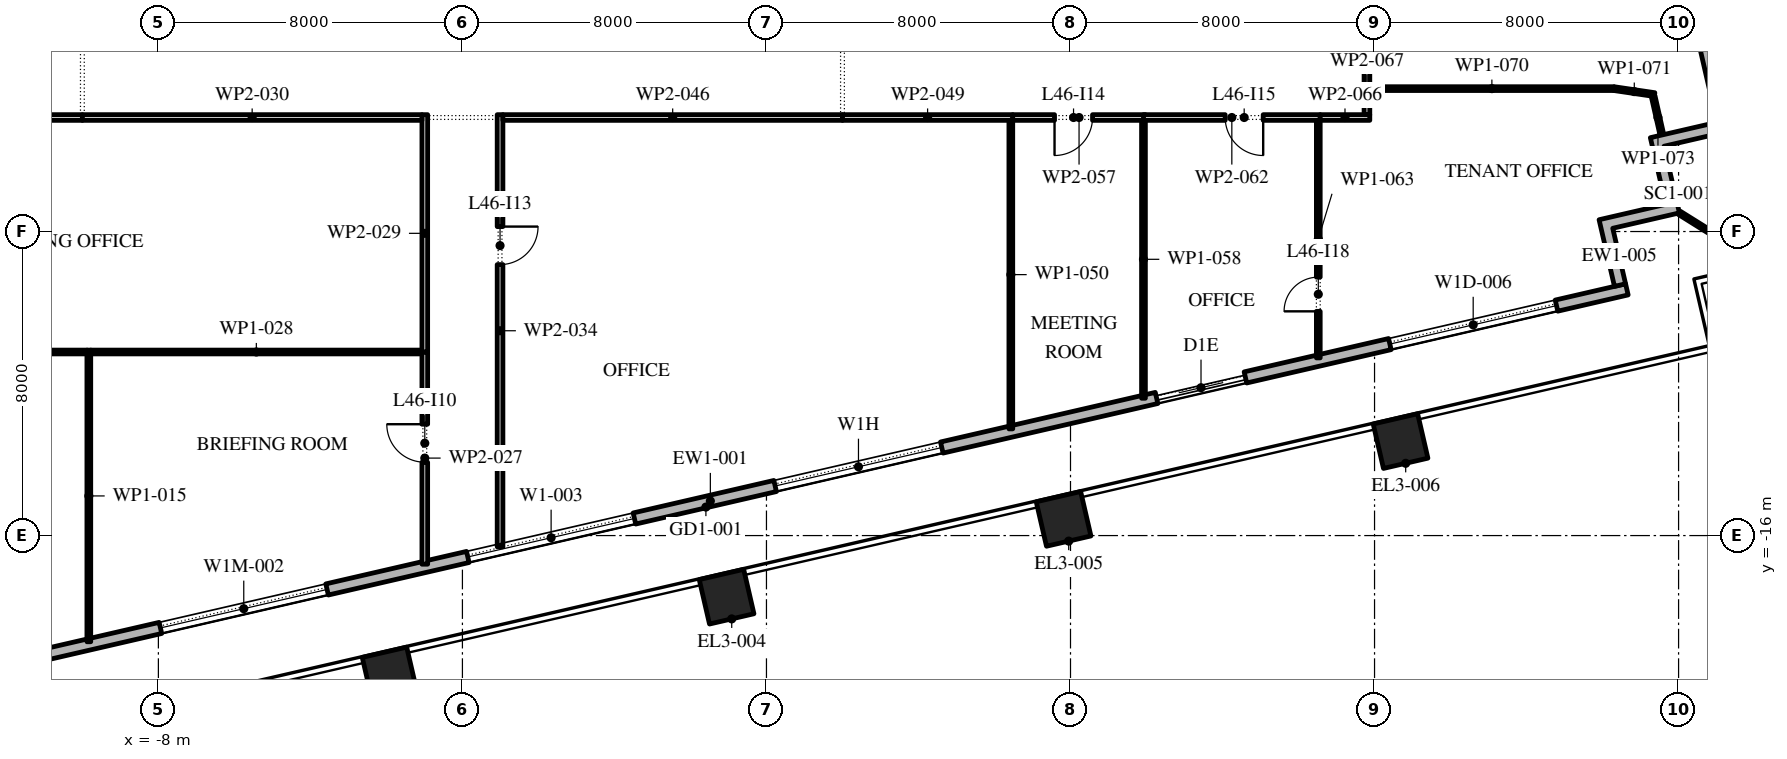
"""IFC4 building model, lengths in metres.
Left out: names, types, materials, properties, quantities, classifications, styles, units other than length and angle.
Written with IfcOpenShell. Run it as: python <this file> out.ifc"""

import sys

from ifc_helpers import new_model, si_unit, direction, frame, frame_2d, origin, origin_2d, place, context, subcontext, project, spatial, polyline, rectangle, outline, extrude, element, fill, save


model = new_model("IFC4")
c1 = context("Model", 3, precision=1e-05, world=origin(), true_north=direction((0.0, 1.0)))
c2 = subcontext(c1, "Body", "Model", "MODEL_VIEW")
j1 = project(units=[si_unit("LENGTHUNIT", "METRE"), si_unit("PLANEANGLEUNIT", "RADIAN")], contexts=[c1])
p1 = place(None, origin())
s1 = spatial("IfcSite", under=j1, at=p1, CompositionType="ELEMENT")
p2 = place(p1, origin())
s2 = spatial("IfcBuilding", under=s1, at=p2, CompositionType="ELEMENT")
p3 = place(p2, frame((0.0, 0.0, 209.4)))
s3 = spatial("IfcBuildingStorey", under=s2, at=p3, CompositionType="ELEMENT", Elevation=209.4)
for number, where, z_axis, x_axis in (
    (1, (-1.916, -19.655, 0.0), (0.0, 0.0, 1.0), (0.974, 0.225, 0.0)),
    (2, (6.951, -17.608, 0.0), (0.0, 0.0, 1.0), (0.974, 0.225, 0.0)),
    (3, (15.818, -15.561, 0.0), (0.0, 0.0, 1.0), (0.974, 0.225, 0.0)),
    (4, (24.685, -13.514, 0.0), (0.0, 0.0, 1.0), (0.974, 0.225, 0.0)),
):
    element("IfcColumn", number, at=place(p3, frame(where, z_axis=z_axis, x_axis=x_axis)), inside=s3, PredefinedType="COLUMN", context=c2, shape_type="SweptSolid", body=[
        extrude(rectangle(XDim=1.2, YDim=1.2, at=origin_2d()), origin(), (0.0, 0.0, 1.0), 4.2),
    ])
p4 = place(p3, frame((-17.592, -20.657, 0.0), z_axis=(0.0, 0.0, 1.0), x_axis=(0.974370243697, 0.224950279389, 0.0)))
e5 = element("IfcWall", 5, at=p4, inside=s3, PredefinedType="STANDARD", context=c2, shape_type="SweptSolid", body=[
    extrude(rectangle(XDim=49.5, YDim=0.3, at=frame_2d((24.75, 0.0))), origin(), (0.0, 0.0, 1.0), 4.0),
])
p5 = place(p4, frame((2.8, 0.0, 0.0)))
e6 = element("IfcOpeningElement", 6, at=p5, cuts=e5, PredefinedType="OPENING", context=c2, shape_type="SweptSolid", body=[
    extrude(rectangle(XDim=2.4, YDim=3.5, at=frame_2d((1.2, 1.75))), frame((0.0, 0.16, 0.0), z_axis=(0.0, -1.0, 0.0), x_axis=(1.0, 0.0, 0.0)), (0.0, 0.0, 1.0), 0.32),
])
p6 = place(p4, frame((9.9, 0.0, 0.45)))
e7 = element("IfcOpeningElement", 7, at=p6, cuts=e5, PredefinedType="OPENING", context=c2, shape_type="SweptSolid", body=[
    extrude(rectangle(XDim=4.5, YDim=2.575, at=frame_2d((2.25, 1.288))), frame((0.0, 0.16, 0.0), z_axis=(0.0, -1.0, 0.0), x_axis=(1.0, 0.0, 0.0)), (0.0, 0.0, 1.0), 0.32),
])
p7 = place(p4, frame((18.2, 0.0, 0.45)))
e8 = element("IfcOpeningElement", 8, at=p7, cuts=e5, PredefinedType="OPENING", context=c2, shape_type="SweptSolid", body=[
    extrude(rectangle(XDim=4.5, YDim=3.05, at=frame_2d((2.25, 1.525))), frame((0.0, 0.16, 0.0), z_axis=(0.0, -1.0, 0.0), x_axis=(1.0, 0.0, 0.0)), (0.0, 0.0, 1.0), 0.32),
])
p8 = place(p4, frame((26.5, 0.0, 0.45)))
e9 = element("IfcOpeningElement", 9, at=p8, cuts=e5, PredefinedType="OPENING", context=c2, shape_type="SweptSolid", body=[
    extrude(rectangle(XDim=4.5, YDim=2.75, at=frame_2d((2.25, 1.375))), frame((0.0, 0.16, 0.0), z_axis=(0.0, -1.0, 0.0), x_axis=(1.0, 0.0, 0.0)), (0.0, 0.0, 1.0), 0.32),
])
p9 = place(p4, frame((36.8, 0.0, 0.0)))
e10 = element("IfcOpeningElement", 10, at=p9, cuts=e5, PredefinedType="OPENING", context=c2, shape_type="SweptSolid", body=[
    extrude(rectangle(XDim=2.4, YDim=3.275, at=frame_2d((1.2, 1.637))), frame((0.0, 0.16, 0.0), z_axis=(0.0, -1.0, 0.0), x_axis=(1.0, 0.0, 0.0)), (0.0, 0.0, 1.0), 0.32),
])
p10 = place(p4, frame((43.1, 0.0, 0.45)))
e11 = element("IfcOpeningElement", 11, at=p10, cuts=e5, PredefinedType="OPENING", context=c2, shape_type="SweptSolid", body=[
    extrude(rectangle(XDim=4.5, YDim=2.875, at=frame_2d((2.25, 1.438))), frame((0.0, 0.16, 0.0), z_axis=(0.0, -1.0, 0.0), x_axis=(1.0, 0.0, 0.0)), (0.0, 0.0, 1.0), 0.32),
])
p11 = place(p3, frame((33.157, -5.092, 0.0), z_axis=(0.0, 0.0, 1.0), x_axis=(-0.224950279389, 0.974370243697, 0.0)))
e12 = element("IfcWall", 12, at=p11, inside=s3, PredefinedType="STANDARD", context=c2, shape_type="SweptSolid", body=[
    extrude(rectangle(XDim=49.5, YDim=0.3, at=frame_2d((24.75, 0.0))), origin(), (0.0, 0.0, 1.0), 4.0),
])
p12 = place(p11, frame((2.207, 0.0, 0.0)))
e13 = element("IfcOpeningElement", 13, at=p12, cuts=e12, PredefinedType="OPENING", context=c2, shape_type="SweptSolid", body=[
    extrude(rectangle(XDim=2.4, YDim=3.125, at=frame_2d((1.2, 1.562))), frame((0.0, 0.16, 0.0), z_axis=(0.0, -1.0, 0.0), x_axis=(1.0, 0.0, 0.0)), (0.0, 0.0, 1.0), 0.32),
])
p13 = place(p11, frame((8.121, 0.0, 0.45)))
e14 = element("IfcOpeningElement", 14, at=p13, cuts=e12, PredefinedType="OPENING", context=c2, shape_type="SweptSolid", body=[
    extrude(rectangle(XDim=4.5, YDim=2.875, at=frame_2d((2.25, 1.438))), frame((0.0, 0.16, 0.0), z_axis=(0.0, -1.0, 0.0), x_axis=(1.0, 0.0, 0.0)), (0.0, 0.0, 1.0), 0.32),
])
p14 = place(p11, frame((15.236, 0.0, 0.45)))
e15 = element("IfcOpeningElement", 15, at=p14, cuts=e12, PredefinedType="OPENING", context=c2, shape_type="SweptSolid", body=[
    extrude(rectangle(XDim=4.5, YDim=2.875, at=frame_2d((2.25, 1.438))), frame((0.0, 0.16, 0.0), z_axis=(0.0, -1.0, 0.0), x_axis=(1.0, 0.0, 0.0)), (0.0, 0.0, 1.0), 0.32),
])
p15 = place(p11, frame((22.35, 0.0, 0.45)))
e16 = element("IfcOpeningElement", 16, at=p15, cuts=e12, PredefinedType="OPENING", context=c2, shape_type="SweptSolid", body=[
    extrude(rectangle(XDim=4.5, YDim=3.0, at=frame_2d((2.25, 1.5))), frame((0.0, 0.16, 0.0), z_axis=(0.0, -1.0, 0.0), x_axis=(1.0, 0.0, 0.0)), (0.0, 0.0, 1.0), 0.32),
])
p16 = place(p11, frame((30.514, 0.0, 0.0)))
e17 = element("IfcOpeningElement", 17, at=p16, cuts=e12, PredefinedType="OPENING", context=c2, shape_type="SweptSolid", body=[
    extrude(rectangle(XDim=2.4, YDim=3.45, at=frame_2d((1.2, 1.725))), frame((0.0, 0.16, 0.0), z_axis=(0.0, -1.0, 0.0), x_axis=(1.0, 0.0, 0.0)), (0.0, 0.0, 1.0), 0.32),
])
p17 = place(p11, frame((36.579, 0.0, 0.45)))
e18 = element("IfcOpeningElement", 18, at=p17, cuts=e12, PredefinedType="OPENING", context=c2, shape_type="SweptSolid", body=[
    extrude(rectangle(XDim=4.5, YDim=3.05, at=frame_2d((2.25, 1.525))), frame((0.0, 0.16, 0.0), z_axis=(0.0, -1.0, 0.0), x_axis=(1.0, 0.0, 0.0)), (0.0, 0.0, 1.0), 0.32),
])
p18 = place(p11, frame((43.693, 0.0, 0.45)))
e19 = element("IfcOpeningElement", 19, at=p18, cuts=e12, PredefinedType="OPENING", context=c2, shape_type="SweptSolid", body=[
    extrude(rectangle(XDim=4.5, YDim=3.05, at=frame_2d((2.25, 1.525))), frame((0.0, 0.16, 0.0), z_axis=(0.0, -1.0, 0.0), x_axis=(1.0, 0.0, 0.0)), (0.0, 0.0, 1.0), 0.32),
])
p19 = place(p3, origin())
e20 = element("IfcWall", 20, at=p19, inside=s3, PredefinedType="STANDARD", context=c2, shape_type="SweptSolid", body=[
    extrude(outline(polyline([(31.662, -7.285), (31.257, -5.531), (33.303, -5.058), (33.371, -5.351), (31.617, -5.756), (32.022, -7.51), (30.268, -7.914), (30.605, -9.376), (30.313, -9.443), (29.908, -7.69), (31.662, -7.285)])), origin(), (0.0, 0.0, 1.0), 4.0),
])
p20 = place(p3, frame((32.022, -7.51, -0.05), z_axis=(0.0, 0.0, 1.0), x_axis=(0.848047176257, -0.529920736377, 0.0)))
e21 = element("IfcWall", 21, at=p20, inside=s3, PredefinedType="STANDARD", context=c2, shape_type="SweptSolid", body=[
    extrude(rectangle(XDim=2.526, YDim=0.1, at=frame_2d((1.263, 0.0))), origin(), (0.0, 0.0, 1.0), 4.05),
])
p21 = place(p3, frame((-10.0, -5.0, 0.0), z_axis=(0.0, 0.0, 1.0), x_axis=(-1.0, 0.0, 0.0)))
e22 = element("IfcWall", 22, at=p21, inside=s3, PredefinedType="PARTITIONING", context=c2, shape_type="SweptSolid", body=[
    extrude(rectangle(XDim=13.715, YDim=0.15, at=frame_2d((6.857, 0.0))), origin(), (0.0, 0.0, 1.0), 4.0),
])
p22 = place(p21, frame((3.64, 0.0, 0.0)))
e23 = element("IfcOpeningElement", 23, at=p22, cuts=e22, PredefinedType="OPENING", context=c2, shape_type="SweptSolid", body=[
    extrude(rectangle(XDim=1.0, YDim=2.1, at=frame_2d((0.5, 1.05))), frame((0.0, 0.085, 0.0), z_axis=(0.0, -1.0, 0.0), x_axis=(1.0, 0.0, 0.0)), (0.0, 0.0, 1.0), 0.17),
])
p23 = place(p3, frame((-9.83, -18.794, 0.0), z_axis=(0.0, 0.0, 1.0), x_axis=(0.0, 1.0, 0.0)))
e24 = element("IfcWall", 24, at=p23, inside=s3, PredefinedType="PARTITIONING", context=c2, shape_type="SweptSolid", body=[
    extrude(rectangle(XDim=7.674, YDim=0.1, at=frame_2d((3.837, 0.0))), origin(), (0.0, 0.0, 1.0), 4.0),
])
p24 = place(p3, frame((-9.88, -11.17, 0.0), z_axis=(0.0, 0.0, 1.0), x_axis=(-1.0, 0.0, 0.0)))
e25 = element("IfcWall", 25, at=p24, inside=s3, PredefinedType="PARTITIONING", context=c2, shape_type="SweptSolid", body=[
    extrude(rectangle(XDim=13.68, YDim=0.1, at=frame_2d((6.84, 0.0))), origin(), (0.0, 0.0, 1.0), 4.0),
])
p25 = place(p24, frame((6.55, 0.0, 0.0)))
e26 = element("IfcOpeningElement", 26, at=p25, cuts=e25, PredefinedType="OPENING", context=c2, shape_type="SweptSolid", body=[
    extrude(rectangle(XDim=0.9, YDim=2.1, at=frame_2d((0.45, 1.05))), frame((0.0, 0.06, 0.0), z_axis=(0.0, -1.0, 0.0), x_axis=(1.0, 0.0, 0.0)), (0.0, 0.0, 1.0), 0.12),
])
p26 = place(p3, frame((-0.99, -16.753, 0.0), z_axis=(0.0, 0.0, 1.0), x_axis=(0.0, 1.0, 0.0)))
e27 = element("IfcWall", 27, at=p26, inside=s3, PredefinedType="PARTITIONING", context=c2, shape_type="SweptSolid", body=[
    extrude(rectangle(XDim=5.583, YDim=0.15, at=frame_2d((2.792, 0.0))), origin(), (0.0, 0.0, 1.0), 4.0),
])
p27 = place(p26, frame((2.683, 0.0, 0.0)))
e28 = element("IfcOpeningElement", 28, at=p27, cuts=e27, PredefinedType="OPENING", context=c2, shape_type="SweptSolid", body=[
    extrude(rectangle(XDim=1.0, YDim=2.1, at=frame_2d((0.5, 1.05))), frame((0.0, 0.085, 0.0), z_axis=(0.0, -1.0, 0.0), x_axis=(1.0, 0.0, 0.0)), (0.0, 0.0, 1.0), 0.17),
])
p28 = place(p3, frame((-1.065, -11.17, 0.0), z_axis=(0.0, 0.0, 1.0), x_axis=(-1.0, 0.0, 0.0)))
e29 = element("IfcWall", 29, at=p28, inside=s3, PredefinedType="PARTITIONING", context=c2, shape_type="SweptSolid", body=[
    extrude(rectangle(XDim=8.715, YDim=0.1, at=frame_2d((4.357, 0.0))), origin(), (0.0, 0.0, 1.0), 4.0),
])
p29 = place(p3, frame((-0.99, -11.17, 0.0), z_axis=(0.0, 0.0, 1.0), x_axis=(0.0, 1.0, 0.0)))
e30 = element("IfcWall", 30, at=p29, inside=s3, PredefinedType="PARTITIONING", context=c2, shape_type="SweptSolid", body=[
    extrude(rectangle(XDim=6.245, YDim=0.15, at=frame_2d((3.123, 0.0))), origin(), (0.0, 0.0, 1.0), 4.0),
])
p30 = place(p3, frame((-1.065, -5.0, 0.0), z_axis=(0.0, 0.0, 1.0), x_axis=(-1.0, 0.0, 0.0)))
e31 = element("IfcWall", 31, at=p30, inside=s3, PredefinedType="PARTITIONING", context=c2, shape_type="SweptSolid", body=[
    extrude(rectangle(XDim=8.935, YDim=0.15, at=frame_2d((4.468, 0.0))), origin(), (0.0, 0.0, 1.0), 4.0),
])
p31 = place(p3, frame((0.99, -4.925, 0.0), z_axis=(0.0, 0.0, 1.0), x_axis=(0.0, -1.0, 0.0)))
e32 = element("IfcWall", 32, at=p31, inside=s3, PredefinedType="PARTITIONING", context=c2, shape_type="SweptSolid", body=[
    extrude(rectangle(XDim=11.371, YDim=0.15, at=frame_2d((5.686, 0.0))), origin(), (0.0, 0.0, 1.0), 4.0),
])
p32 = place(p31, frame((2.945, 0.0, 0.0)))
e33 = element("IfcOpeningElement", 33, at=p32, cuts=e32, PredefinedType="OPENING", context=c2, shape_type="SweptSolid", body=[
    extrude(rectangle(XDim=1.0, YDim=2.1, at=frame_2d((0.5, 1.05))), frame((0.0, 0.085, 0.0), z_axis=(0.0, -1.0, 0.0), x_axis=(1.0, 0.0, 0.0)), (0.0, 0.0, 1.0), 0.17),
])
p33 = place(p3, frame((10.0, -5.0, 0.0), z_axis=(0.0, 0.0, 1.0), x_axis=(-1.0, 0.0, 0.0)))
e34 = element("IfcWall", 34, at=p33, inside=s3, PredefinedType="PARTITIONING", context=c2, shape_type="SweptSolid", body=[
    extrude(rectangle(XDim=8.935, YDim=0.15, at=frame_2d((4.468, 0.0))), origin(), (0.0, 0.0, 1.0), 4.0),
])
p34 = place(p3, frame((14.48, -5.0, 0.0), z_axis=(0.0, 0.0, 1.0), x_axis=(-1.0, 0.0, 0.0)))
e35 = element("IfcWall", 35, at=p34, inside=s3, PredefinedType="PARTITIONING", context=c2, shape_type="SweptSolid", body=[
    extrude(rectangle(XDim=4.48, YDim=0.15, at=frame_2d((2.24, 0.0))), origin(), (0.0, 0.0, 1.0), 4.0),
])
p35 = place(p3, frame((14.43, -5.075, 0.0), z_axis=(0.0, 0.0, 1.0), x_axis=(0.0, -1.0, 0.0)))
e36 = element("IfcWall", 36, at=p35, inside=s3, PredefinedType="PARTITIONING", context=c2, shape_type="SweptSolid", body=[
    extrude(rectangle(XDim=8.118, YDim=0.1, at=frame_2d((4.059, 0.0))), origin(), (0.0, 0.0, 1.0), 4.0),
])
p36 = place(p3, frame((17.97, -5.0, 0.0), z_axis=(0.0, 0.0, 1.0), x_axis=(-1.0, 0.0, 0.0)))
e37 = element("IfcWall", 37, at=p36, inside=s3, PredefinedType="PARTITIONING", context=c2, shape_type="SweptSolid", body=[
    extrude(rectangle(XDim=3.49, YDim=0.15, at=frame_2d((1.745, 0.0))), origin(), (0.0, 0.0, 1.0), 4.0),
])
p37 = place(p36, frame((1.39, 0.0, 0.0)))
e38 = element("IfcOpeningElement", 38, at=p37, cuts=e37, PredefinedType="OPENING", context=c2, shape_type="SweptSolid", body=[
    extrude(rectangle(XDim=1.0, YDim=2.1, at=frame_2d((0.5, 1.05))), frame((0.0, 0.085, 0.0), z_axis=(0.0, -1.0, 0.0), x_axis=(1.0, 0.0, 0.0)), (0.0, 0.0, 1.0), 0.17),
])
p38 = place(p3, frame((17.92, -5.075, 0.0), z_axis=(0.0, 0.0, 1.0), x_axis=(0.0, -1.0, 0.0)))
e39 = element("IfcWall", 39, at=p38, inside=s3, PredefinedType="PARTITIONING", context=c2, shape_type="SweptSolid", body=[
    extrude(rectangle(XDim=7.312, YDim=0.1, at=frame_2d((3.656, 0.0))), origin(), (0.0, 0.0, 1.0), 4.0),
])
p39 = place(p3, frame((22.57, -5.0, 0.0), z_axis=(0.0, 0.0, 1.0), x_axis=(-1.0, 0.0, 0.0)))
e40 = element("IfcWall", 40, at=p39, inside=s3, PredefinedType="PARTITIONING", context=c2, shape_type="SweptSolid", body=[
    extrude(rectangle(XDim=4.65, YDim=0.15, at=frame_2d((2.325, 0.0))), origin(), (0.0, 0.0, 1.0), 4.0),
])
p40 = place(p39, frame((1.5, 0.0, 0.0)))
e41 = element("IfcOpeningElement", 41, at=p40, cuts=e40, PredefinedType="OPENING", context=c2, shape_type="SweptSolid", body=[
    extrude(rectangle(XDim=1.0, YDim=2.1, at=frame_2d((0.5, 1.05))), frame((0.0, 0.085, 0.0), z_axis=(0.0, -1.0, 0.0), x_axis=(1.0, 0.0, 0.0)), (0.0, 0.0, 1.0), 0.17),
])
p41 = place(p3, frame((22.52, -5.075, 0.0), z_axis=(0.0, 0.0, 1.0), x_axis=(0.0, -1.0, 0.0)))
e42 = element("IfcWall", 42, at=p41, inside=s3, PredefinedType="PARTITIONING", context=c2, shape_type="SweptSolid", body=[
    extrude(rectangle(XDim=6.25, YDim=0.1, at=frame_2d((3.125, 0.0))), origin(), (0.0, 0.0, 1.0), 4.0),
])
p42 = place(p41, frame((4.125, 0.0, 0.0)))
e43 = element("IfcOpeningElement", 43, at=p42, cuts=e42, PredefinedType="OPENING", context=c2, shape_type="SweptSolid", body=[
    extrude(rectangle(XDim=0.9, YDim=2.1, at=frame_2d((0.45, 1.05))), frame((0.0, 0.06, 0.0), z_axis=(0.0, -1.0, 0.0), x_axis=(1.0, 0.0, 0.0)), (0.0, 0.0, 1.0), 0.12),
])
p43 = place(p3, frame((23.875, -5.0, 0.0), z_axis=(0.0, 0.0, 1.0), x_axis=(-1.0, 0.0, 0.0)))
e44 = element("IfcWall", 44, at=p43, inside=s3, PredefinedType="PARTITIONING", context=c2, shape_type="SweptSolid", body=[
    extrude(rectangle(XDim=1.305, YDim=0.15, at=frame_2d((0.652, 0.0))), origin(), (0.0, 0.0, 1.0), 4.0),
])
p44 = place(p3, frame((23.8, -4.29, 0.0), z_axis=(0.0, 0.0, 1.0), x_axis=(0.0, -1.0, 0.0)))
e45 = element("IfcWall", 45, at=p44, inside=s3, PredefinedType="PARTITIONING", context=c2, shape_type="SweptSolid", body=[
    extrude(rectangle(XDim=0.635, YDim=0.15, at=frame_2d((0.317, 0.0))), origin(), (0.0, 0.0, 1.0), 4.0),
])
p45 = place(p3, frame((23.8, 2.64, 0.0), z_axis=(0.0, 0.0, 1.0), x_axis=(0.0, -1.0, 0.0)))
e46 = element("IfcWall", 46, at=p45, inside=s3, PredefinedType="PARTITIONING", context=c2, shape_type="SweptSolid", body=[
    extrude(rectangle(XDim=6.93, YDim=0.15, at=frame_2d((3.465, 0.0))), origin(), (0.0, 0.0, 1.0), 4.0),
])
p46 = place(p45, frame((2.98, 0.0, 0.0)))
e47 = element("IfcOpeningElement", 47, at=p46, cuts=e46, PredefinedType="OPENING", context=c2, shape_type="SweptSolid", body=[
    extrude(rectangle(XDim=1.0, YDim=2.1, at=frame_2d((0.5, 1.05))), frame((0.0, 0.085, 0.0), z_axis=(0.0, -1.0, 0.0), x_axis=(1.0, 0.0, 0.0)), (0.0, 0.0, 1.0), 0.17),
])
p47 = place(p3, frame((30.3, -4.24, 0.0), z_axis=(0.0, 0.0, 1.0), x_axis=(-1.0, 0.0, 0.0)))
e48 = element("IfcWall", 48, at=p47, inside=s3, PredefinedType="PARTITIONING", context=c2, shape_type="SweptSolid", body=[
    extrude(rectangle(XDim=6.425, YDim=0.1, at=frame_2d((3.212, 0.0))), origin(), (0.0, 0.0, 1.0), 4.0),
])
p48 = place(p3, frame((31.369, -4.397, 0.0), z_axis=(0.0, 0.0, 1.0), x_axis=(-0.989385908309, 0.145311817963, 0.0)))
e49 = element("IfcWall", 49, at=p48, inside=s3, PredefinedType="PARTITIONING", context=c2, shape_type="SweptSolid", body=[
    extrude(rectangle(XDim=1.08, YDim=0.1, at=frame_2d((0.54, 0.0))), origin(), (0.0, 0.0, 1.0), 4.0),
])
p49 = place(p3, frame((31.584, -5.558, 0.0), z_axis=(0.0, 0.0, 1.0), x_axis=(-0.220443734992, 0.975399692281, 0.0)))
e50 = element("IfcWall", 50, at=p49, inside=s3, PredefinedType="PARTITIONING", context=c2, shape_type="SweptSolid", body=[
    extrude(rectangle(XDim=1.147, YDim=0.1, at=frame_2d((0.574, 0.0))), origin(), (0.0, 0.0, 1.0), 4.0),
])
p50 = place(p6, origin())
e51 = element("IfcWindow", 51, at=p50, inside=s3, PartitioningType="DOUBLE_PANEL_VERTICAL", PredefinedType="WINDOW", context=c2, shape_type="SweptSolid", body=[
    extrude(rectangle(XDim=4.5, YDim=2.575, at=frame_2d((2.25, 1.288))), frame((0.0, 0.03, 0.0), z_axis=(0.0, -1.0, 0.0), x_axis=(1.0, 0.0, 0.0)), (0.0, 0.0, 1.0), 0.06),
])
fill(e7, e51)
p51 = place(p7, origin())
e52 = element("IfcWindow", 52, at=p51, inside=s3, PartitioningType="DOUBLE_PANEL_VERTICAL", PredefinedType="WINDOW", context=c2, shape_type="SweptSolid", body=[
    extrude(rectangle(XDim=4.5, YDim=3.05, at=frame_2d((2.25, 1.525))), frame((0.0, 0.03, 0.0), z_axis=(0.0, -1.0, 0.0), x_axis=(1.0, 0.0, 0.0)), (0.0, 0.0, 1.0), 0.06),
])
fill(e8, e52)
p52 = place(p8, origin())
e53 = element("IfcWindow", 53, at=p52, inside=s3, PartitioningType="DOUBLE_PANEL_VERTICAL", PredefinedType="WINDOW", context=c2, shape_type="SweptSolid", body=[
    extrude(rectangle(XDim=4.5, YDim=2.75, at=frame_2d((2.25, 1.375))), frame((0.0, 0.03, 0.0), z_axis=(0.0, -1.0, 0.0), x_axis=(1.0, 0.0, 0.0)), (0.0, 0.0, 1.0), 0.06),
])
fill(e9, e53)
p53 = place(p9, origin())
e54 = element("IfcDoor", 54, at=p53, inside=s3, OperationType="DOUBLE_DOOR_SLIDING", PredefinedType="DOOR", context=c2, shape_type="SweptSolid", body=[
    extrude(rectangle(XDim=2.4, YDim=3.275, at=frame_2d((1.2, 1.637))), frame((0.0, 0.025, 0.0), z_axis=(0.0, -1.0, 0.0), x_axis=(1.0, 0.0, 0.0)), (0.0, 0.0, 1.0), 0.05),
])
fill(e10, e54)
p54 = place(p10, origin())
e55 = element("IfcWindow", 55, at=p54, inside=s3, PartitioningType="DOUBLE_PANEL_VERTICAL", PredefinedType="WINDOW", context=c2, shape_type="SweptSolid", body=[
    extrude(rectangle(XDim=4.5, YDim=2.875, at=frame_2d((2.25, 1.438))), frame((0.0, 0.03, 0.0), z_axis=(0.0, -1.0, 0.0), x_axis=(1.0, 0.0, 0.0)), (0.0, 0.0, 1.0), 0.06),
])
fill(e11, e55)
p55 = place(p27, origin())
e56 = element("IfcDoor", 56, at=p55, inside=s3, OperationType="SINGLE_SWING_LEFT", PredefinedType="DOOR", context=c2, shape_type="SweptSolid", body=[
    extrude(rectangle(XDim=1.0, YDim=2.1, at=frame_2d((0.5, 1.05))), frame((0.0, 0.025, 0.0), z_axis=(0.0, -1.0, 0.0), x_axis=(1.0, 0.0, 0.0)), (0.0, 0.0, 1.0), 0.05),
])
fill(e28, e56)
p56 = place(p32, origin())
e57 = element("IfcDoor", 57, at=p56, inside=s3, OperationType="SINGLE_SWING_RIGHT", PredefinedType="DOOR", context=c2, shape_type="SweptSolid", body=[
    extrude(rectangle(XDim=1.0, YDim=2.1, at=frame_2d((0.5, 1.05))), frame((0.0, 0.025, 0.0), z_axis=(0.0, -1.0, 0.0), x_axis=(1.0, 0.0, 0.0)), (0.0, 0.0, 1.0), 0.05),
])
fill(e33, e57)
p57 = place(p37, origin())
e58 = element("IfcDoor", 58, at=p57, inside=s3, OperationType="SINGLE_SWING_LEFT", PredefinedType="DOOR", context=c2, shape_type="SweptSolid", body=[
    extrude(rectangle(XDim=1.0, YDim=2.1, at=frame_2d((0.5, 1.05))), frame((0.0, 0.025, 0.0), z_axis=(0.0, -1.0, 0.0), x_axis=(1.0, 0.0, 0.0)), (0.0, 0.0, 1.0), 0.05),
])
fill(e38, e58)
p58 = place(p40, origin())
e59 = element("IfcDoor", 59, at=p58, inside=s3, OperationType="SINGLE_SWING_RIGHT", PredefinedType="DOOR", context=c2, shape_type="SweptSolid", body=[
    extrude(rectangle(XDim=1.0, YDim=2.1, at=frame_2d((0.5, 1.05))), frame((0.0, 0.025, 0.0), z_axis=(0.0, -1.0, 0.0), x_axis=(1.0, 0.0, 0.0)), (0.0, 0.0, 1.0), 0.05),
])
fill(e41, e59)
p59 = place(p42, frame((0.9, 0.0, 0.0), z_axis=(0.0, 0.0, 1.0), x_axis=(-1.0, 0.0, 0.0)))
e60 = element("IfcDoor", 60, at=p59, inside=s3, OperationType="SINGLE_SWING_RIGHT", PredefinedType="DOOR", context=c2, shape_type="SweptSolid", body=[
    extrude(rectangle(XDim=0.9, YDim=2.1, at=frame_2d((0.45, 1.05))), frame((0.0, 0.025, 0.0), z_axis=(0.0, -1.0, 0.0), x_axis=(1.0, 0.0, 0.0)), (0.0, 0.0, 1.0), 0.05),
])
fill(e43, e60)
save(model, sys.argv[1])
